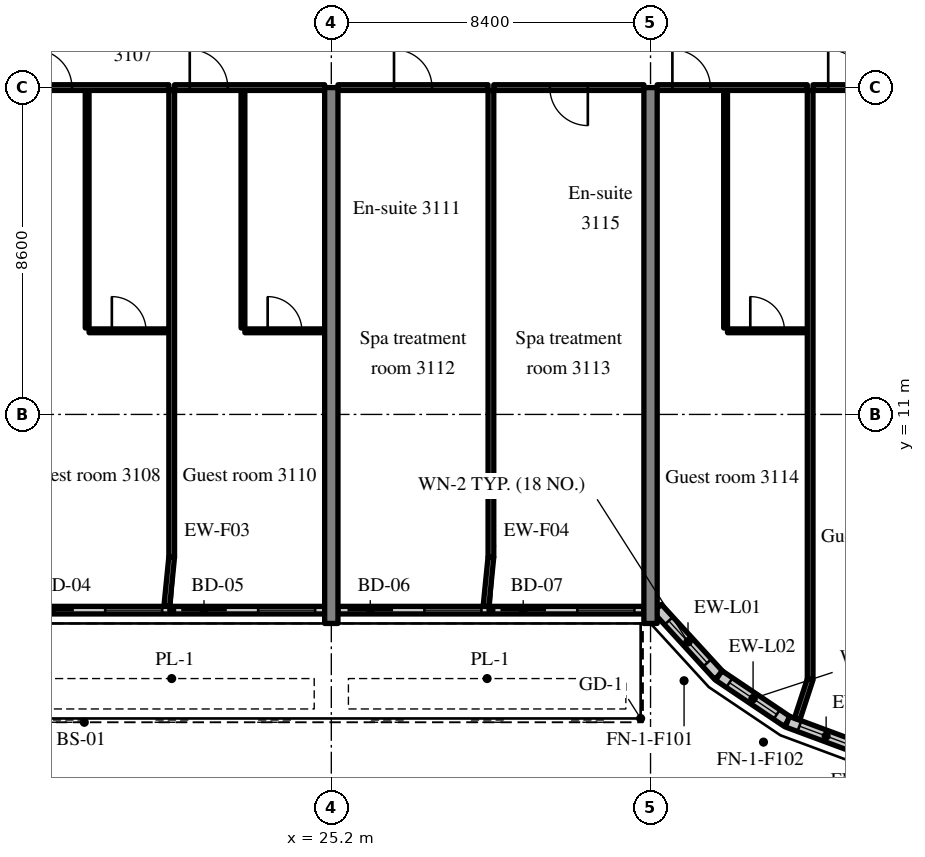
"""IFC4 building model, lengths in metres.
Left out: names, types, materials, properties, quantities, classifications, styles, units other than length and angle.
Written with IfcOpenShell. Run it as: python <this file> out.ifc"""

import sys

from ifc_helpers import new_model, si_unit, direction, frame, frame_2d, origin, place, context, subcontext, project, spatial, rectangle, extrude, source, transform, mapped, element, fill, save


model = new_model("IFC4")
c1 = context("Model", 3, precision=1e-05, world=origin(), true_north=direction((0.0, 1.0)))
c2 = subcontext(c1, "Body", "Model", "MODEL_VIEW")
j1 = project(units=[si_unit("LENGTHUNIT", "METRE"), si_unit("PLANEANGLEUNIT", "RADIAN")], contexts=[c1])
p1 = place(None, origin())
s1 = spatial("IfcSite", under=j1, at=p1, CompositionType="ELEMENT")
p2 = place(p1, origin())
s2 = spatial("IfcBuilding", under=s1, at=p2, CompositionType="ELEMENT")
p3 = place(p2, frame((0.0, 0.0, 129.4)))
s3 = spatial("IfcBuildingStorey", under=s2, at=p3, CompositionType="ELEMENT", Elevation=129.4)
m1 = source(origin(), c2, "Body", "SweptSolid", [
    extrude(rectangle(XDim=14.1, YDim=0.35, at=frame_2d((7.05, 0.0))), origin(), (0.0, 0.0, 1.0), 3.52),
])
for number, where, z_axis, x_axis in (
    (1, (25.2, 5.5, 0.0), (0.0, 0.0, 1.0), (0.0, 1.0, 0.0)),
    (2, (33.6, 5.5, 0.0), (0.0, 0.0, 1.0), (0.0, 1.0, 0.0)),
):
    element("IfcWall", number, at=place(p3, frame(where, z_axis=z_axis, x_axis=x_axis)), inside=s3, PredefinedType="SHEAR", context=c2, shape_type="MappedRepresentation", body=[
        mapped(m1, transform((0.0, 0.0, 0.0), scale=1.0)),
    ])
m2 = source(origin(), c2, "Body", "SweptSolid", [
    extrude(rectangle(XDim=8.05, YDim=0.2, at=frame_2d((4.025, 0.0))), origin(), (0.0, 0.0, 1.0), 2.82),
])
p4 = place(p3, frame((16.975, 5.85, 0.0), z_axis=(0.0, 0.0, 1.0), x_axis=(1.0, 0.0, 0.0)))
e3 = element("IfcWall", 3, at=p4, inside=s3, PredefinedType="SOLIDWALL", context=c2, shape_type="MappedRepresentation", body=[
    mapped(m2, transform((0.0, 0.0, 0.0), scale=1.0)),
])
m3 = source(origin(), c2, "Body", "SweptSolid", [
    extrude(rectangle(XDim=1.2, YDim=2.4, at=frame_2d((0.6, 1.2))), frame((0.0, 0.11, 0.0), z_axis=(0.0, -1.0, 0.0), x_axis=(1.0, 0.0, 0.0)), (0.0, 0.0, 1.0), 0.22),
])
p5 = place(p4, frame((0.25, 0.0, 0.0)))
e4 = element("IfcOpeningElement", 4, at=p5, cuts=e3, PredefinedType="OPENING", context=c2, shape_type="MappedRepresentation", body=[
    mapped(m3, transform((0.0, 0.0, 0.0), scale=1.0)),
])
m4 = source(origin(), c2, "Body", "SweptSolid", [
    extrude(rectangle(XDim=1.5, YDim=1.5, at=frame_2d((0.75, 0.75))), frame((0.0, 0.11, 0.0), z_axis=(0.0, -1.0, 0.0), x_axis=(1.0, 0.0, 0.0)), (0.0, 0.0, 1.0), 0.22),
])
p6 = place(p4, frame((2.275, 0.0, 0.9)))
e5 = element("IfcOpeningElement", 5, at=p6, cuts=e3, PredefinedType="OPENING", context=c2, shape_type="MappedRepresentation", body=[
    mapped(m4, transform((0.0, 0.0, 0.0), scale=1.0)),
])
p7 = place(p4, frame((4.275, 0.0, 0.0)))
e6 = element("IfcOpeningElement", 6, at=p7, cuts=e3, PredefinedType="OPENING", context=c2, shape_type="MappedRepresentation", body=[
    mapped(m3, transform((0.0, 0.0, 0.0), scale=1.0)),
])
p8 = place(p4, frame((6.3, 0.0, 0.9)))
e7 = element("IfcOpeningElement", 7, at=p8, cuts=e3, PredefinedType="OPENING", context=c2, shape_type="MappedRepresentation", body=[
    mapped(m4, transform((0.0, 0.0, 0.0), scale=1.0)),
])
m5 = source(origin(), c2, "Body", "SweptSolid", [
    extrude(rectangle(XDim=8.05, YDim=0.2, at=frame_2d((4.025, 0.0))), origin(), (0.0, 0.0, 1.0), 2.82),
])
p9 = place(p3, frame((25.375, 5.85, 0.0), z_axis=(0.0, 0.0, 1.0), x_axis=(1.0, 0.0, 0.0)))
e8 = element("IfcWall", 8, at=p9, inside=s3, PredefinedType="SOLIDWALL", context=c2, shape_type="MappedRepresentation", body=[
    mapped(m5, transform((0.0, 0.0, 0.0), scale=1.0)),
])
p10 = place(p9, frame((0.25, 0.0, 0.0)))
e9 = element("IfcOpeningElement", 9, at=p10, cuts=e8, PredefinedType="OPENING", context=c2, shape_type="MappedRepresentation", body=[
    mapped(m3, transform((0.0, 0.0, 0.0), scale=1.0)),
])
p11 = place(p9, frame((2.275, 0.0, 0.9)))
e10 = element("IfcOpeningElement", 10, at=p11, cuts=e8, PredefinedType="OPENING", context=c2, shape_type="MappedRepresentation", body=[
    mapped(m4, transform((0.0, 0.0, 0.0), scale=1.0)),
])
p12 = place(p9, frame((4.275, 0.0, 0.0)))
e11 = element("IfcOpeningElement", 11, at=p12, cuts=e8, PredefinedType="OPENING", context=c2, shape_type="MappedRepresentation", body=[
    mapped(m3, transform((0.0, 0.0, 0.0), scale=1.0)),
])
p13 = place(p9, frame((6.3, 0.0, 0.9)))
e12 = element("IfcOpeningElement", 12, at=p13, cuts=e8, PredefinedType="OPENING", context=c2, shape_type="MappedRepresentation", body=[
    mapped(m4, transform((0.0, 0.0, 0.0), scale=1.0)),
])
m6 = source(origin(), c2, "Body", "SweptSolid", [
    extrude(rectangle(XDim=2.398, YDim=0.3, at=frame_2d((1.199, 0.0))), origin(), (0.0, 0.0, 1.0), 3.52),
])
p14 = place(p3, frame((33.776, 5.9, 0.0), z_axis=(0.0, 0.0, 1.0), x_axis=(0.675374189419, -0.737475222815, 0.0)))
e13 = element("IfcWall", 13, at=p14, inside=s3, PredefinedType="SOLIDWALL", context=c2, shape_type="MappedRepresentation", body=[
    mapped(m6, transform((0.0, 0.0, 0.0), scale=1.0)),
])
m7 = source(origin(), c2, "Body", "SweptSolid", [
    extrude(rectangle(XDim=1.5, YDim=2.0, at=frame_2d((0.75, 1.0))), frame((0.0, 0.16, 0.0), z_axis=(0.0, -1.0, 0.0), x_axis=(1.0, 0.0, 0.0)), (0.0, 0.0, 1.0), 0.32),
])
p15 = place(p14, frame((0.449, 0.0, 0.9)))
e14 = element("IfcOpeningElement", 14, at=p15, cuts=e13, PredefinedType="OPENING", context=c2, shape_type="MappedRepresentation", body=[
    mapped(m7, transform((0.0, 0.0, 0.0), scale=1.0)),
])
m8 = source(origin(), c2, "Body", "SweptSolid", [
    extrude(rectangle(XDim=2.176, YDim=0.3, at=frame_2d((1.088, 0.0))), origin(), (0.0, 0.0, 1.0), 3.52),
])
p16 = place(p3, frame((35.396, 4.131, 0.0), z_axis=(0.0, 0.0, 1.0), x_axis=(0.829590746428, -0.558371913192, 0.0)))
e15 = element("IfcWall", 15, at=p16, inside=s3, PredefinedType="SOLIDWALL", context=c2, shape_type="MappedRepresentation", body=[
    mapped(m8, transform((0.0, 0.0, 0.0), scale=1.0)),
])
p17 = place(p16, frame((0.338, 0.0, 0.9)))
e16 = element("IfcOpeningElement", 16, at=p17, cuts=e15, PredefinedType="OPENING", context=c2, shape_type="MappedRepresentation", body=[
    mapped(m7, transform((0.0, 0.0, 0.0), scale=1.0)),
])
p18 = place(p3, frame((37.201, 2.917, 0.0), z_axis=(0.0, 0.0, 1.0), x_axis=(0.93754555999, -0.347862505801, 0.0)))
e17 = element("IfcWall", 17, at=p18, inside=s3, PredefinedType="SOLIDWALL", context=c2, shape_type="MappedRepresentation", body=[
    mapped(m8, transform((0.0, 0.0, 0.0), scale=1.0)),
])
p19 = place(p18, frame((0.338, 0.0, 0.9)))
e18 = element("IfcOpeningElement", 18, at=p19, cuts=e17, PredefinedType="OPENING", context=c2, shape_type="MappedRepresentation", body=[
    mapped(m7, transform((0.0, 0.0, 0.0), scale=1.0)),
])
m9 = source(origin(), c2, "Body", "SweptSolid", [
    extrude(rectangle(XDim=6.25, YDim=0.1, at=frame_2d((3.125, 0.0))), origin(), (0.0, 0.0, 1.0), 3.52),
])
p20 = place(p3, frame((18.775, 13.275, 0.0), z_axis=(0.0, 0.0, 1.0), x_axis=(0.0, 1.0, 0.0)))
e19 = element("IfcWall", 19, at=p20, inside=s3, PredefinedType="PARTITIONING", context=c2, shape_type="MappedRepresentation", body=[
    mapped(m9, transform((0.0, 0.0, 0.0), scale=1.0)),
])
m10 = source(origin(), c2, "Body", "SweptSolid", [
    extrude(rectangle(XDim=2.1, YDim=0.1, at=frame_2d((1.05, 0.0))), origin(), (0.0, 0.0, 1.0), 3.52),
])
p21 = place(p3, frame((18.825, 13.2, 0.0), z_axis=(0.0, 0.0, 1.0), x_axis=(1.0, 0.0, 0.0)))
e20 = element("IfcWall", 20, at=p21, inside=s3, PredefinedType="PARTITIONING", context=c2, shape_type="MappedRepresentation", body=[
    mapped(m10, transform((0.0, 0.0, 0.0), scale=1.0)),
])
m11 = source(origin(), c2, "Body", "SweptSolid", [
    extrude(rectangle(XDim=0.9, YDim=2.1, at=frame_2d((0.45, 1.05))), frame((0.0, 0.06, 0.0), z_axis=(0.0, -1.0, 0.0), x_axis=(1.0, 0.0, 0.0)), (0.0, 0.0, 1.0), 0.12),
])
p22 = place(p21, frame((0.6, 0.0, 0.0)))
e21 = element("IfcOpeningElement", 21, at=p22, cuts=e20, PredefinedType="OPENING", context=c2, shape_type="MappedRepresentation", body=[
    mapped(m11, transform((0.0, 0.0, 0.0), scale=1.0)),
])
m12 = source(origin(), c2, "Body", "SweptSolid", [
    extrude(rectangle(XDim=3.95, YDim=0.15, at=frame_2d((1.975, 0.0))), origin(), (0.0, 0.0, 1.0), 2.82),
])
p23 = place(p3, frame((16.975, 19.6, 0.0), z_axis=(0.0, 0.0, 1.0), x_axis=(1.0, 0.0, 0.0)))
e22 = element("IfcWall", 22, at=p23, inside=s3, PredefinedType="PARTITIONING", context=c2, shape_type="MappedRepresentation", body=[
    mapped(m12, transform((0.0, 0.0, 0.0), scale=1.0)),
])
m13 = source(origin(), c2, "Body", "SweptSolid", [
    extrude(rectangle(XDim=1.0, YDim=2.1, at=frame_2d((0.5, 1.05))), frame((0.0, 0.085, 0.0), z_axis=(0.0, -1.0, 0.0), x_axis=(1.0, 0.0, 0.0)), (0.0, 0.0, 1.0), 0.17),
])
p24 = place(p23, frame((0.4, 0.0, 0.0)))
e23 = element("IfcOpeningElement", 23, at=p24, cuts=e22, PredefinedType="OPENING", context=c2, shape_type="MappedRepresentation", body=[
    mapped(m13, transform((0.0, 0.0, 0.0), scale=1.0)),
])
p25 = place(p3, frame((22.875, 13.275, 0.0), z_axis=(0.0, 0.0, 1.0), x_axis=(0.0, 1.0, 0.0)))
e24 = element("IfcWall", 24, at=p25, inside=s3, PredefinedType="PARTITIONING", context=c2, shape_type="MappedRepresentation", body=[
    mapped(m9, transform((0.0, 0.0, 0.0), scale=1.0)),
])
m14 = source(origin(), c2, "Body", "SweptSolid", [
    extrude(rectangle(XDim=2.1, YDim=0.1, at=frame_2d((1.05, 0.0))), origin(), (0.0, 0.0, 1.0), 3.52),
])
p26 = place(p3, frame((22.925, 13.2, 0.0), z_axis=(0.0, 0.0, 1.0), x_axis=(1.0, 0.0, 0.0)))
e25 = element("IfcWall", 25, at=p26, inside=s3, PredefinedType="PARTITIONING", context=c2, shape_type="MappedRepresentation", body=[
    mapped(m14, transform((0.0, 0.0, 0.0), scale=1.0)),
])
p27 = place(p26, frame((0.6, 0.0, 0.0)))
e26 = element("IfcOpeningElement", 26, at=p27, cuts=e25, PredefinedType="OPENING", context=c2, shape_type="MappedRepresentation", body=[
    mapped(m11, transform((0.0, 0.0, 0.0), scale=1.0)),
])
p28 = place(p3, frame((21.075, 19.6, 0.0), z_axis=(0.0, 0.0, 1.0), x_axis=(1.0, 0.0, 0.0)))
e27 = element("IfcWall", 27, at=p28, inside=s3, PredefinedType="PARTITIONING", context=c2, shape_type="MappedRepresentation", body=[
    mapped(m12, transform((0.0, 0.0, 0.0), scale=1.0)),
])
p29 = place(p28, frame((0.4, 0.0, 0.0)))
e28 = element("IfcOpeningElement", 28, at=p29, cuts=e27, PredefinedType="OPENING", context=c2, shape_type="MappedRepresentation", body=[
    mapped(m13, transform((0.0, 0.0, 0.0), scale=1.0)),
])
m15 = source(origin(), c2, "Body", "SweptSolid", [
    extrude(rectangle(XDim=12.275, YDim=0.15, at=frame_2d((6.137, 0.0))), origin(), (0.0, 0.0, 1.0), 3.52),
])
p30 = place(p3, frame((21.0, 7.25, 0.0), z_axis=(0.0, 0.0, 1.0), x_axis=(0.0, 1.0, 0.0)))
e29 = element("IfcWall", 29, at=p30, inside=s3, PredefinedType="PARTITIONING", context=c2, shape_type="MappedRepresentation", body=[
    mapped(m15, transform((0.0, 0.0, 0.0), scale=1.0)),
])
p31 = place(p3, frame((25.375, 19.6, 0.0), z_axis=(0.0, 0.0, 1.0), x_axis=(1.0, 0.0, 0.0)))
e30 = element("IfcWall", 30, at=p31, inside=s3, PredefinedType="PARTITIONING", context=c2, shape_type="MappedRepresentation", body=[
    mapped(m12, transform((0.0, 0.0, 0.0), scale=1.0)),
])
p32 = place(p31, frame((1.475, 0.0, 0.0)))
e31 = element("IfcOpeningElement", 31, at=p32, cuts=e30, PredefinedType="OPENING", context=c2, shape_type="MappedRepresentation", body=[
    mapped(m13, transform((0.0, 0.0, 0.0), scale=1.0)),
])
p33 = place(p3, frame((29.475, 19.6, 0.0), z_axis=(0.0, 0.0, 1.0), x_axis=(1.0, 0.0, 0.0)))
e32 = element("IfcWall", 32, at=p33, inside=s3, PredefinedType="PARTITIONING", context=c2, shape_type="MappedRepresentation", body=[
    mapped(m12, transform((0.0, 0.0, 0.0), scale=1.0)),
])
p34 = place(p33, frame((1.475, 0.0, 0.0)))
e33 = element("IfcOpeningElement", 33, at=p34, cuts=e32, PredefinedType="OPENING", context=c2, shape_type="MappedRepresentation", body=[
    mapped(m13, transform((0.0, 0.0, 0.0), scale=1.0)),
])
p35 = place(p3, frame((29.4, 7.25, 0.0), z_axis=(0.0, 0.0, 1.0), x_axis=(0.0, 1.0, 0.0)))
e34 = element("IfcWall", 34, at=p35, inside=s3, PredefinedType="PARTITIONING", context=c2, shape_type="MappedRepresentation", body=[
    mapped(m15, transform((0.0, 0.0, 0.0), scale=1.0)),
])
p36 = place(p3, frame((35.575, 13.275, 0.0), z_axis=(0.0, 0.0, 1.0), x_axis=(0.0, 1.0, 0.0)))
e35 = element("IfcWall", 35, at=p36, inside=s3, PredefinedType="PARTITIONING", context=c2, shape_type="MappedRepresentation", body=[
    mapped(m9, transform((0.0, 0.0, 0.0), scale=1.0)),
])
p37 = place(p3, frame((35.625, 13.2, 0.0), z_axis=(0.0, 0.0, 1.0), x_axis=(1.0, 0.0, 0.0)))
e36 = element("IfcWall", 36, at=p37, inside=s3, PredefinedType="PARTITIONING", context=c2, shape_type="MappedRepresentation", body=[
    mapped(m10, transform((0.0, 0.0, 0.0), scale=1.0)),
])
p38 = place(p37, frame((0.6, 0.0, 0.0)))
e37 = element("IfcOpeningElement", 37, at=p38, cuts=e36, PredefinedType="OPENING", context=c2, shape_type="MappedRepresentation", body=[
    mapped(m11, transform((0.0, 0.0, 0.0), scale=1.0)),
])
m16 = source(origin(), c2, "Body", "SweptSolid", [
    extrude(rectangle(XDim=3.95, YDim=0.15, at=frame_2d((1.975, 0.0))), origin(), (0.0, 0.0, 1.0), 2.82),
])
p39 = place(p3, frame((33.775, 19.6, 0.0), z_axis=(0.0, 0.0, 1.0), x_axis=(1.0, 0.0, 0.0)))
e38 = element("IfcWall", 38, at=p39, inside=s3, PredefinedType="PARTITIONING", context=c2, shape_type="MappedRepresentation", body=[
    mapped(m16, transform((0.0, 0.0, 0.0), scale=1.0)),
])
p40 = place(p39, frame((0.4, 0.0, 0.0)))
e39 = element("IfcOpeningElement", 39, at=p40, cuts=e38, PredefinedType="OPENING", context=c2, shape_type="MappedRepresentation", body=[
    mapped(m13, transform((0.0, 0.0, 0.0), scale=1.0)),
])
p41 = place(p3, frame((37.875, 19.6, 0.0), z_axis=(0.0, 0.0, 1.0), x_axis=(1.0, 0.0, 0.0)))
e40 = element("IfcWall", 40, at=p41, inside=s3, PredefinedType="PARTITIONING", context=c2, shape_type="MappedRepresentation", body=[
    mapped(m12, transform((0.0, 0.0, 0.0), scale=1.0)),
])
p42 = place(p41, frame((0.4, 0.0, 0.0)))
e41 = element("IfcOpeningElement", 41, at=p42, cuts=e40, PredefinedType="OPENING", context=c2, shape_type="MappedRepresentation", body=[
    mapped(m13, transform((0.0, 0.0, 0.0), scale=1.0)),
])
m17 = source(origin(), c2, "Body", "SweptSolid", [
    extrude(rectangle(XDim=15.498, YDim=0.15, at=frame_2d((7.749, 0.0))), origin(), (0.0, 0.0, 1.0), 3.52),
])
p43 = place(p3, frame((37.8, 4.027, 0.0), z_axis=(0.0, 0.0, 1.0), x_axis=(0.0, 1.0, 0.0)))
e42 = element("IfcWall", 42, at=p43, inside=s3, PredefinedType="PARTITIONING", context=c2, shape_type="MappedRepresentation", body=[
    mapped(m17, transform((0.0, 0.0, 0.0), scale=1.0)),
])
m18 = source(origin(), c2, "Body", "SweptSolid", [
    extrude(rectangle(XDim=1.307, YDim=0.15, at=frame_2d((0.653, 0.0))), origin(), (0.0, 0.0, 1.0), 3.52),
])
for number, where, z_axis, x_axis in (
    (43, (20.87, 5.95, 0.0), (0.0, 0.0, 1.0), (0.099, 0.995, 0.0)),
    (44, (29.27, 5.95, 0.0), (0.0, 0.0, 1.0), (0.099, 0.995, 0.0)),
):
    element("IfcWall", number, at=place(p3, frame(where, z_axis=z_axis, x_axis=x_axis)), inside=s3, PredefinedType="PARTITIONING", context=c2, shape_type="MappedRepresentation", body=[
        mapped(m18, transform((0.0, 0.0, 0.0), scale=1.0)),
    ])
m19 = source(origin(), c2, "Body", "SweptSolid", [
    extrude(rectangle(XDim=1.101, YDim=0.15, at=frame_2d((0.55, 0.0))), origin(), (0.0, 0.0, 1.0), 3.52),
])
p44 = place(p3, frame((37.457, 2.981, 0.0), z_axis=(0.0, 0.0, 1.0), x_axis=(0.311567081539, 0.950224159712, 0.0)))
e45 = element("IfcWall", 45, at=p44, inside=s3, PredefinedType="PARTITIONING", context=c2, shape_type="MappedRepresentation", body=[
    mapped(m19, transform((0.0, 0.0, 0.0), scale=1.0)),
])
m20 = source(origin(), c2, "Body", "SweptSolid", [
    extrude(rectangle(XDim=1.2, YDim=2.4, at=frame_2d((0.6, 1.2))), frame((0.0, 0.025, 0.0), z_axis=(0.0, -1.0, 0.0), x_axis=(1.0, 0.0, 0.0)), (0.0, 0.0, 1.0), 0.05),
])
p45 = place(p5, origin())
e46 = element("IfcDoor", 46, at=p45, inside=s3, OperationType="SLIDING_TO_RIGHT", PredefinedType="DOOR", context=c2, shape_type="MappedRepresentation", body=[
    mapped(m20, transform((0.0, 0.0, 0.0), scale=1.0)),
])
fill(e4, e46)
m21 = source(origin(), c2, "Body", "SweptSolid", [
    extrude(rectangle(XDim=1.5, YDim=1.5, at=frame_2d((0.75, 0.75))), frame((0.0, 0.03, 0.0), z_axis=(0.0, -1.0, 0.0), x_axis=(1.0, 0.0, 0.0)), (0.0, 0.0, 1.0), 0.06),
])
p46 = place(p6, origin())
e47 = element("IfcWindow", 47, at=p46, inside=s3, PartitioningType="SINGLE_PANEL", PredefinedType="WINDOW", context=c2, shape_type="MappedRepresentation", body=[
    mapped(m21, transform((0.0, 0.0, 0.0), scale=1.0)),
])
fill(e5, e47)
p47 = place(p7, origin())
e48 = element("IfcDoor", 48, at=p47, inside=s3, OperationType="SLIDING_TO_LEFT", PredefinedType="DOOR", context=c2, shape_type="MappedRepresentation", body=[
    mapped(m20, transform((0.0, 0.0, 0.0), scale=1.0)),
])
fill(e6, e48)
p48 = place(p8, origin())
e49 = element("IfcWindow", 49, at=p48, inside=s3, PartitioningType="SINGLE_PANEL", PredefinedType="WINDOW", context=c2, shape_type="MappedRepresentation", body=[
    mapped(m21, transform((0.0, 0.0, 0.0), scale=1.0)),
])
fill(e7, e49)
p49 = place(p10, origin())
e50 = element("IfcDoor", 50, at=p49, inside=s3, OperationType="SLIDING_TO_RIGHT", PredefinedType="DOOR", context=c2, shape_type="MappedRepresentation", body=[
    mapped(m20, transform((0.0, 0.0, 0.0), scale=1.0)),
])
fill(e9, e50)
p50 = place(p11, origin())
e51 = element("IfcWindow", 51, at=p50, inside=s3, PartitioningType="SINGLE_PANEL", PredefinedType="WINDOW", context=c2, shape_type="MappedRepresentation", body=[
    mapped(m21, transform((0.0, 0.0, 0.0), scale=1.0)),
])
fill(e10, e51)
p51 = place(p12, origin())
e52 = element("IfcDoor", 52, at=p51, inside=s3, OperationType="SLIDING_TO_LEFT", PredefinedType="DOOR", context=c2, shape_type="MappedRepresentation", body=[
    mapped(m20, transform((0.0, 0.0, 0.0), scale=1.0)),
])
fill(e11, e52)
p52 = place(p13, origin())
e53 = element("IfcWindow", 53, at=p52, inside=s3, PartitioningType="SINGLE_PANEL", PredefinedType="WINDOW", context=c2, shape_type="MappedRepresentation", body=[
    mapped(m21, transform((0.0, 0.0, 0.0), scale=1.0)),
])
fill(e12, e53)
m22 = source(origin(), c2, "Body", "SweptSolid", [
    extrude(rectangle(XDim=1.5, YDim=2.0, at=frame_2d((0.75, 1.0))), frame((0.0, 0.03, 0.0), z_axis=(0.0, -1.0, 0.0), x_axis=(1.0, 0.0, 0.0)), (0.0, 0.0, 1.0), 0.06),
])
p53 = place(p15, origin())
e54 = element("IfcWindow", 54, at=p53, inside=s3, PartitioningType="SINGLE_PANEL", PredefinedType="WINDOW", context=c2, shape_type="MappedRepresentation", body=[
    mapped(m22, transform((0.0, 0.0, 0.0), scale=1.0)),
])
fill(e14, e54)
p54 = place(p17, origin())
e55 = element("IfcWindow", 55, at=p54, inside=s3, PartitioningType="SINGLE_PANEL", PredefinedType="WINDOW", context=c2, shape_type="MappedRepresentation", body=[
    mapped(m22, transform((0.0, 0.0, 0.0), scale=1.0)),
])
fill(e16, e55)
p55 = place(p19, origin())
e56 = element("IfcWindow", 56, at=p55, inside=s3, PartitioningType="SINGLE_PANEL", PredefinedType="WINDOW", context=c2, shape_type="MappedRepresentation", body=[
    mapped(m22, transform((0.0, 0.0, 0.0), scale=1.0)),
])
fill(e18, e56)
m23 = source(origin(), c2, "Body", "SweptSolid", [
    extrude(rectangle(XDim=0.9, YDim=2.1, at=frame_2d((0.45, 1.05))), frame((0.0, 0.025, 0.0), z_axis=(0.0, -1.0, 0.0), x_axis=(1.0, 0.0, 0.0)), (0.0, 0.0, 1.0), 0.05),
])
p56 = place(p22, origin())
e57 = element("IfcDoor", 57, at=p56, inside=s3, OperationType="SINGLE_SWING_LEFT", PredefinedType="DOOR", context=c2, shape_type="MappedRepresentation", body=[
    mapped(m23, transform((0.0, 0.0, 0.0), scale=1.0)),
])
fill(e21, e57)
m24 = source(origin(), c2, "Body", "SweptSolid", [
    extrude(rectangle(XDim=1.0, YDim=2.1, at=frame_2d((0.5, 1.05))), frame((0.0, 0.025, 0.0), z_axis=(0.0, -1.0, 0.0), x_axis=(1.0, 0.0, 0.0)), (0.0, 0.0, 1.0), 0.05),
])
p57 = place(p24, origin())
e58 = element("IfcDoor", 58, at=p57, inside=s3, OperationType="SINGLE_SWING_LEFT", PredefinedType="DOOR", context=c2, shape_type="MappedRepresentation", body=[
    mapped(m24, transform((0.0, 0.0, 0.0), scale=1.0)),
])
fill(e23, e58)
p58 = place(p27, origin())
e59 = element("IfcDoor", 59, at=p58, inside=s3, OperationType="SINGLE_SWING_LEFT", PredefinedType="DOOR", context=c2, shape_type="MappedRepresentation", body=[
    mapped(m23, transform((0.0, 0.0, 0.0), scale=1.0)),
])
fill(e26, e59)
p59 = place(p29, origin())
e60 = element("IfcDoor", 60, at=p59, inside=s3, OperationType="SINGLE_SWING_LEFT", PredefinedType="DOOR", context=c2, shape_type="MappedRepresentation", body=[
    mapped(m24, transform((0.0, 0.0, 0.0), scale=1.0)),
])
fill(e28, e60)
p60 = place(p32, origin())
e61 = element("IfcDoor", 61, at=p60, inside=s3, OperationType="SINGLE_SWING_LEFT", PredefinedType="DOOR", context=c2, shape_type="MappedRepresentation", body=[
    mapped(m24, transform((0.0, 0.0, 0.0), scale=1.0)),
])
fill(e31, e61)
p61 = place(p34, origin())
e62 = element("IfcDoor", 62, at=p61, inside=s3, OperationType="SINGLE_SWING_RIGHT", PredefinedType="DOOR", context=c2, shape_type="MappedRepresentation", body=[
    mapped(m24, transform((0.0, 0.0, 0.0), scale=1.0)),
])
fill(e33, e62)
p62 = place(p38, origin())
e63 = element("IfcDoor", 63, at=p62, inside=s3, OperationType="SINGLE_SWING_LEFT", PredefinedType="DOOR", context=c2, shape_type="MappedRepresentation", body=[
    mapped(m23, transform((0.0, 0.0, 0.0), scale=1.0)),
])
fill(e37, e63)
p63 = place(p40, origin())
e64 = element("IfcDoor", 64, at=p63, inside=s3, OperationType="SINGLE_SWING_LEFT", PredefinedType="DOOR", context=c2, shape_type="MappedRepresentation", body=[
    mapped(m24, transform((0.0, 0.0, 0.0), scale=1.0)),
])
fill(e39, e64)
p64 = place(p42, origin())
e65 = element("IfcDoor", 65, at=p64, inside=s3, OperationType="SINGLE_SWING_LEFT", PredefinedType="DOOR", context=c2, shape_type="MappedRepresentation", body=[
    mapped(m24, transform((0.0, 0.0, 0.0), scale=1.0)),
])
fill(e41, e65)
save(model, sys.argv[1])
